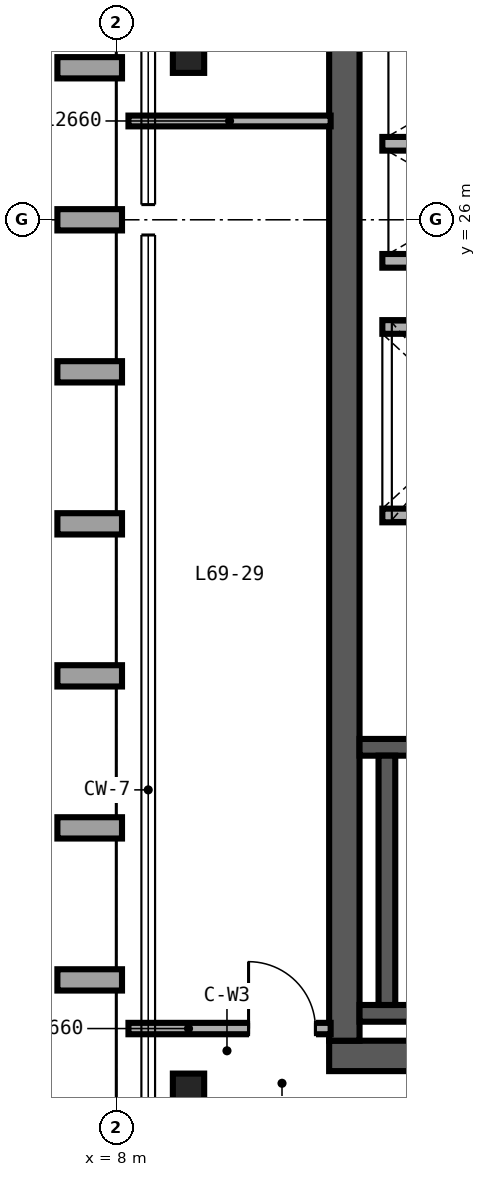
"""IFC4 building model, lengths in metres.
Left out: names, types, materials, properties, quantities, classifications, styles, units other than length and angle.
Written with IfcOpenShell. Run it as: python <this file> out.ifc"""

import sys

from ifc_helpers import new_model, si_unit, direction, frame, frame_2d, origin, origin_2d, place, context, subcontext, project, spatial, rectangle, i_section, extrude, source, transform, mapped, element, fill, save


model = new_model("IFC4")
c1 = context("Model", 3, precision=1e-05, world=origin(), true_north=direction((0.0, 1.0)))
c2 = subcontext(c1, "Body", "Model", "MODEL_VIEW")
j1 = project(units=[si_unit("LENGTHUNIT", "METRE"), si_unit("PLANEANGLEUNIT", "RADIAN")], contexts=[c1])
p1 = place(None, origin())
s1 = spatial("IfcSite", under=j1, at=p1, CompositionType="ELEMENT")
p2 = place(p1, origin())
s2 = spatial("IfcBuilding", under=s1, at=p2, CompositionType="ELEMENT")
p3 = place(p2, frame((0.0, 0.0, 272.4)))
s3 = spatial("IfcBuildingStorey", under=s2, at=p3, CompositionType="ELEMENT", Elevation=272.4)
p4 = place(p3, frame((10.8, 15.0, 0.0), z_axis=(0.0, 0.0, 1.0), x_axis=(1.0, 0.0, 0.0)))
e1 = element("IfcWall", 1, at=p4, inside=s3, PredefinedType="SHEAR", context=c2, shape_type="SweptSolid", body=[
    extrude(rectangle(XDim=12.4, YDim=0.4, at=frame_2d((6.2, 0.0))), origin(), (0.0, 0.0, 1.0), 3.38),
])
p5 = place(p4, frame((10.1, 0.0, 0.0)))
e2 = element("IfcOpeningElement", 2, at=p5, cuts=e1, PredefinedType="OPENING", context=c2, shape_type="SweptSolid", body=[
    extrude(rectangle(XDim=1.0, YDim=2.15, at=frame_2d((0.5, 1.075))), frame((0.0, 0.21, 0.0), z_axis=(0.0, -1.0, 0.0), x_axis=(1.0, 0.0, 0.0)), (0.0, 0.0, 1.0), 0.42),
])
p6 = place(p3, frame((11.0, 15.2, 0.0), z_axis=(0.0, 0.0, 1.0), x_axis=(0.0, 1.0, 0.0)))
e3 = element("IfcWall", 3, at=p6, inside=s3, PredefinedType="SHEAR", context=c2, shape_type="SweptSolid", body=[
    extrude(rectangle(XDim=21.6, YDim=0.4, at=frame_2d((10.8, 0.0))), origin(), (0.0, 0.0, 1.0), 3.38),
])
p7 = place(p3, frame((11.2, 15.56, 0.0), z_axis=(0.0, 0.0, 1.0), x_axis=(1.0, 0.0, 0.0)))
e4 = element("IfcWall", 4, at=p7, inside=s3, PredefinedType="SHEAR", context=c2, shape_type="SweptSolid", body=[
    extrude(rectangle(XDim=8.11, YDim=0.22, at=frame_2d((4.055, 0.0))), origin(), (0.0, 0.0, 1.0), 3.4),
])
p8 = place(p3, frame((11.2, 19.06, 0.0), z_axis=(0.0, 0.0, 1.0), x_axis=(1.0, 0.0, 0.0)))
e5 = element("IfcWall", 5, at=p8, inside=s3, PredefinedType="SHEAR", context=c2, shape_type="SweptSolid", body=[
    extrude(rectangle(XDim=8.11, YDim=0.22, at=frame_2d((4.055, 0.0))), origin(), (0.0, 0.0, 1.0), 3.4),
])
p9 = place(p8, frame((0.72, 0.0, 0.0)))
e6 = element("IfcOpeningElement", 6, at=p9, cuts=e5, PredefinedType="OPENING", context=c2, shape_type="SweptSolid", body=[
    extrude(rectangle(XDim=1.05, YDim=2.15, at=frame_2d((0.525, 1.075))), frame((0.0, 0.12, 0.0), z_axis=(0.0, -1.0, 0.0), x_axis=(1.0, 0.0, 0.0)), (0.0, 0.0, 1.0), 0.24),
])
p10 = place(p3, frame((11.56, 15.67, 0.0), z_axis=(0.0, 0.0, 1.0), x_axis=(0.0, 1.0, 0.0)))
e7 = element("IfcWall", 7, at=p10, inside=s3, PredefinedType="SHEAR", context=c2, shape_type="SweptSolid", body=[
    extrude(rectangle(XDim=3.28, YDim=0.22, at=frame_2d((1.64, 0.0))), origin(), (0.0, 0.0, 1.0), 3.4),
])
m1 = source(origin(), c2, "Body", "SweptSolid", [
    extrude(i_section(OverallWidth=0.412, OverallDepth=0.435, WebThickness=0.036, FlangeThickness=0.057, FilletRadius=0.025, at=origin_2d()), origin(), (0.0, 0.0, 1.0), 3.38),
])
for number, where, z_axis, x_axis in (
    (8, (8.95, 14.55, 0.0), (0.0, 0.0, 1.0), (1.0, 0.0, 0.0)),
    (9, (8.95, 28.15, 0.0), (0.0, 0.0, 1.0), (1.0, 0.0, 0.0)),
):
    element("IfcColumn", number, at=place(p3, frame(where, z_axis=z_axis, x_axis=x_axis)), inside=s3, PredefinedType="COLUMN", context=c2, shape_type="MappedRepresentation", body=[
        mapped(m1, transform((0.0, 0.0, 0.0), scale=1.0)),
    ])
for number, where, z_axis, x_axis in (
    (10, (11.5, 22.11, 0.0), (0.0, 0.0, 1.0), (1.0, 0.0, 0.0)),
    (11, (11.5, 24.59, 0.0), (0.0, 0.0, 1.0), (1.0, 0.0, 0.0)),
):
    element("IfcWall", number, at=place(p3, frame(where, z_axis=z_axis, x_axis=x_axis)), inside=s3, PredefinedType="SOLIDWALL", context=c2, shape_type="SweptSolid", body=[
        extrude(rectangle(XDim=2.5, YDim=0.18, at=frame_2d((1.25, 0.0))), origin(), (0.0, 0.0, 1.0), 3.38),
    ])
for number, where, z_axis, x_axis in (
    (12, (11.5, 25.46, 0.0), (0.0, 0.0, 1.0), (1.0, 0.0, 0.0)),
    (13, (11.5, 27.0, 0.0), (0.0, 0.0, 1.0), (1.0, 0.0, 0.0)),
):
    element("IfcWall", number, at=place(p3, frame(where, z_axis=z_axis, x_axis=x_axis)), inside=s3, PredefinedType="SOLIDWALL", context=c2, shape_type="SweptSolid", body=[
        extrude(rectangle(XDim=2.51, YDim=0.18, at=frame_2d((1.255, 0.0))), origin(), (0.0, 0.0, 1.0), 3.38),
    ])
p11 = place(p3, frame((8.16, 15.36, 0.0), z_axis=(0.0, 0.0, 1.0), x_axis=(1.0, 0.0, 0.0)))
e14 = element("IfcWall", 14, at=p11, inside=s3, PredefinedType="PARTITIONING", context=c2, shape_type="SweptSolid", body=[
    extrude(rectangle(XDim=2.66, YDim=0.15, at=frame_2d((1.33, 0.0))), origin(), (0.0, 0.0, 1.0), 2.601),
])
p12 = place(p11, frame((1.58, 0.0, 0.0)))
e15 = element("IfcOpeningElement", 15, at=p12, cuts=e14, PredefinedType="OPENING", context=c2, shape_type="SweptSolid", body=[
    extrude(rectangle(XDim=0.88, YDim=2.15, at=frame_2d((0.44, 1.075))), frame((0.0, 0.085, 0.0), z_axis=(0.0, -1.0, 0.0), x_axis=(1.0, 0.0, 0.0)), (0.0, 0.0, 1.0), 0.17),
])
p13 = place(p3, frame((8.16, 27.3, 0.0), z_axis=(0.0, 0.0, 1.0), x_axis=(1.0, 0.0, 0.0)))
e16 = element("IfcWall", 16, at=p13, inside=s3, PredefinedType="PARTITIONING", context=c2, shape_type="SweptSolid", body=[
    extrude(rectangle(XDim=2.66, YDim=0.142, at=frame_2d((1.33, 0.0))), origin(), (0.0, 0.0, 1.0), 2.601),
])
m2 = source(origin(), c2, "Body", "SweptSolid", [
    extrude(rectangle(XDim=0.88, YDim=2.15, at=frame_2d((0.44, 1.075))), frame((0.0, 0.025, 0.0), z_axis=(0.0, -1.0, 0.0), x_axis=(1.0, 0.0, 0.0)), (0.0, 0.0, 1.0), 0.05),
])
p14 = place(p12, origin())
e17 = element("IfcDoor", 17, at=p14, inside=s3, OperationType="SINGLE_SWING_LEFT", PredefinedType="DOOR", context=c2, shape_type="MappedRepresentation", body=[
    mapped(m2, transform((0.0, 0.0, 0.0), scale=1.0)),
])
fill(e15, e17)
save(model, sys.argv[1])
